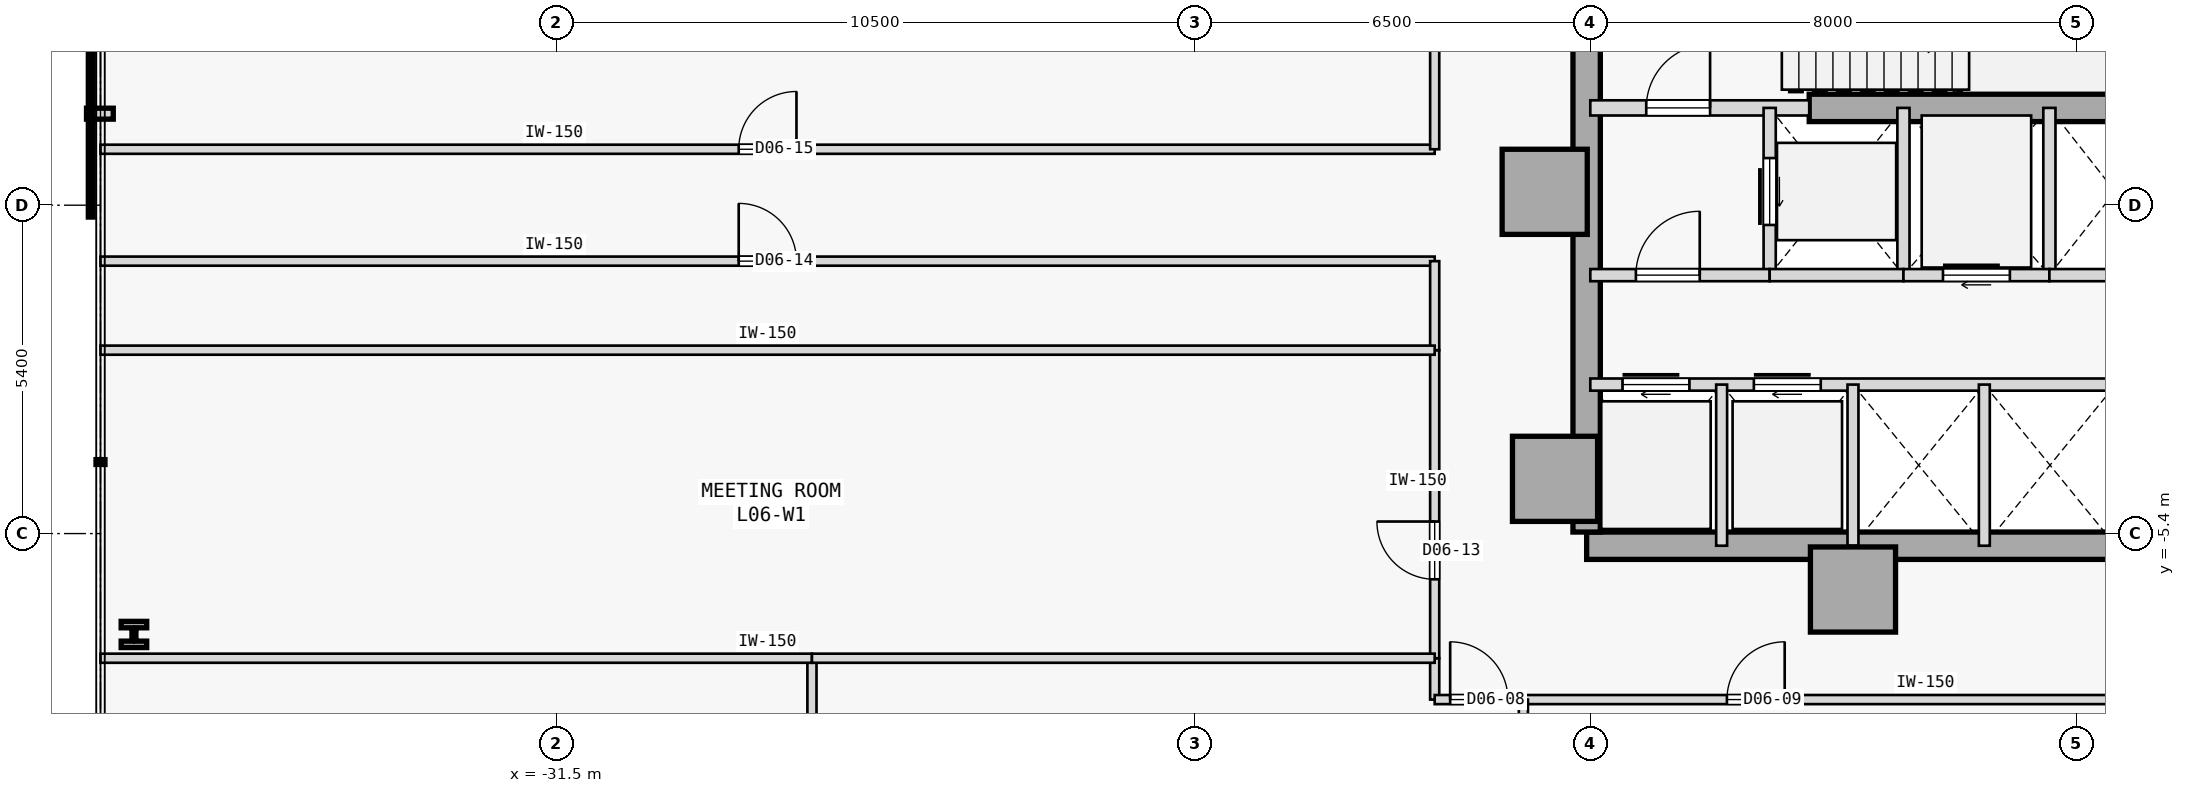
"""IFC4 building model, lengths in metres.
Left out: names, types, materials, properties, quantities, classifications, styles, units other than length and angle.
Written with IfcOpenShell. Run it as: python <this file> out.ifc"""

import sys

from ifc_helpers import new_model, si_unit, direction, frame, frame_2d, origin, origin_2d, place, context, subcontext, project, spatial, rectangle, i_section, extrude, element, fill, save


model = new_model("IFC4")
c1 = context("Model", 3, precision=1e-05, world=origin(), true_north=direction((0.0, 1.0)))
c2 = subcontext(c1, "Body", "Model", "MODEL_VIEW")
j1 = project(units=[si_unit("LENGTHUNIT", "METRE"), si_unit("PLANEANGLEUNIT", "RADIAN")], contexts=[c1])
p1 = place(None, origin())
s1 = spatial("IfcSite", under=j1, at=p1, CompositionType="ELEMENT")
p2 = place(p1, origin())
s2 = spatial("IfcBuilding", under=s1, at=p2, CompositionType="ELEMENT")
p3 = place(p2, frame((0.0, 0.0, 29.4)))
s3 = spatial("IfcBuildingStorey", under=s2, at=p3, CompositionType="ELEMENT", Elevation=29.4)
for number, where, z_axis, x_axis in (
    (1, (-15.25, 0.22, 0.0), (0.0, 0.0, 1.0), (1.0, 0.0, 0.0)),
    (2, (-15.08, -4.5, 0.0), (0.0, 0.0, 1.0), (1.0, 0.0, 0.0)),
    (3, (-10.18, -6.32, 0.0), (0.0, 0.0, 1.0), (1.0, 0.0, 0.0)),
):
    element("IfcColumn", number, at=place(p3, frame(where, z_axis=z_axis, x_axis=x_axis)), inside=s3, PredefinedType="COLUMN", context=c2, shape_type="SweptSolid", body=[
        extrude(rectangle(XDim=1.4, YDim=1.4, at=origin_2d()), origin(), (0.0, 0.0, 1.0), 3.8),
    ])
p4 = place(p3, frame((-14.56, -5.6, 0.0), z_axis=(0.0, 0.0, 1.0), x_axis=(1.0, 0.0, 0.0)))
e4 = element("IfcWall", 4, at=p4, inside=s3, PredefinedType="SHEAR", context=c2, shape_type="SweptSolid", body=[
    extrude(rectangle(XDim=10.86, YDim=0.45, at=frame_2d((5.43, 0.0))), origin(), (0.0, 0.0, 1.0), 3.575),
])
p5 = place(p3, frame((-14.56, -5.375, 0.0), z_axis=(0.0, 0.0, 1.0), x_axis=(0.0, 1.0, 0.0)))
e5 = element("IfcWall", 5, at=p5, inside=s3, PredefinedType="SHEAR", context=c2, shape_type="SweptSolid", body=[
    extrude(rectangle(XDim=10.75, YDim=0.45, at=frame_2d((5.375, 0.0))), origin(), (0.0, 0.0, 1.0), 3.575),
])
p6 = place(p3, frame((-10.9, 1.6, 0.0), z_axis=(0.0, 0.0, 1.0), x_axis=(1.0, 0.0, 0.0)))
e6 = element("IfcWall", 6, at=p6, inside=s3, PredefinedType="SHEAR", context=c2, shape_type="SweptSolid", body=[
    extrude(rectangle(XDim=5.15, YDim=0.45, at=frame_2d((2.575, 0.0))), origin(), (0.0, 0.0, 1.0), 3.575),
])
p7 = place(p3, frame((-38.45, -7.059, 0.0), z_axis=(0.0, 0.0, 1.0), x_axis=(1.0, 0.0, 0.0)))
e7 = element("IfcColumn", 7, at=p7, inside=s3, PredefinedType="COLUMN", context=c2, shape_type="SweptSolid", body=[
    extrude(i_section(OverallWidth=0.42, OverallDepth=0.431, WebThickness=0.065, FlangeThickness=0.106, FilletRadius=0.015, at=origin_2d()), origin(), (0.0, 0.0, 1.0), 3.8),
])
p8 = place(p3, frame((-14.5, 1.6, 0.0), z_axis=(0.0, 0.0, 1.0), x_axis=(1.0, 0.0, 0.0)))
e8 = element("IfcWall", 8, at=p8, inside=s3, PredefinedType="STANDARD", context=c2, shape_type="SweptSolid", body=[
    extrude(rectangle(XDim=3.6, YDim=0.25, at=frame_2d((1.8, 0.0))), origin(), (0.0, 0.0, 1.0), 3.575),
])
p9 = place(p8, frame((0.92, 0.0, 0.0)))
e9 = element("IfcOpeningElement", 9, at=p9, cuts=e8, PredefinedType="OPENING", context=c2, shape_type="SweptSolid", body=[
    extrude(rectangle(XDim=1.05, YDim=2.15, at=frame_2d((0.525, 1.075))), frame((0.0, 0.135, 0.0), z_axis=(0.0, -1.0, 0.0), x_axis=(1.0, 0.0, 0.0)), (0.0, 0.0, 1.0), 0.27),
])
p10 = place(p3, frame((-11.55, -1.15, 0.0), z_axis=(0.0, 0.0, 1.0), x_axis=(0.0, 1.0, 0.0)))
e10 = element("IfcWall", 10, at=p10, inside=s3, PredefinedType="STANDARD", context=c2, shape_type="SweptSolid", body=[
    extrude(rectangle(XDim=2.75, YDim=0.2, at=frame_2d((1.375, 0.0))), origin(), (0.0, 0.0, 1.0), 3.575),
])
p11 = place(p10, frame((0.825, 0.0, 0.0)))
e11 = element("IfcOpeningElement", 11, at=p11, cuts=e10, PredefinedType="OPENING", context=c2, shape_type="SweptSolid", body=[
    extrude(rectangle(XDim=1.1, YDim=2.15, at=frame_2d((0.55, 1.075))), frame((0.0, 0.11, 0.0), z_axis=(0.0, -1.0, 0.0), x_axis=(1.0, 0.0, 0.0)), (0.0, 0.0, 1.0), 0.22),
])
p12 = place(p3, frame((-9.35, -1.15, 0.0), z_axis=(0.0, 0.0, 1.0), x_axis=(0.0, 1.0, 0.0)))
e12 = element("IfcWall", 12, at=p12, inside=s3, PredefinedType="STANDARD", context=c2, shape_type="SweptSolid", body=[
    extrude(rectangle(XDim=2.75, YDim=0.2, at=frame_2d((1.375, 0.0))), origin(), (0.0, 0.0, 1.0), 3.575),
])
p13 = place(p3, frame((-14.5, -1.15, 0.0), z_axis=(0.0, 0.0, 1.0), x_axis=(1.0, 0.0, 0.0)))
e13 = element("IfcWall", 13, at=p13, inside=s3, PredefinedType="STANDARD", context=c2, shape_type="SweptSolid", body=[
    extrude(rectangle(XDim=2.95, YDim=0.2, at=frame_2d((1.475, 0.0))), origin(), (0.0, 0.0, 1.0), 3.575),
])
p14 = place(p13, frame((0.75, 0.0, 0.0)))
e14 = element("IfcOpeningElement", 14, at=p14, cuts=e13, PredefinedType="OPENING", context=c2, shape_type="SweptSolid", body=[
    extrude(rectangle(XDim=1.05, YDim=2.18, at=frame_2d((0.525, 1.09))), frame((0.0, 0.11, 0.0), z_axis=(0.0, -1.0, 0.0), x_axis=(1.0, 0.0, 0.0)), (0.0, 0.0, 1.0), 0.22),
])
p15 = place(p3, frame((-11.55, -1.15, 0.0), z_axis=(0.0, 0.0, 1.0), x_axis=(1.0, 0.0, 0.0)))
e15 = element("IfcWall", 15, at=p15, inside=s3, PredefinedType="STANDARD", context=c2, shape_type="SweptSolid", body=[
    extrude(rectangle(XDim=2.2, YDim=0.2, at=frame_2d((1.1, 0.0))), origin(), (0.0, 0.0, 1.0), 3.575),
])
p16 = place(p3, frame((-6.95, -1.15, 0.0), z_axis=(0.0, 0.0, 1.0), x_axis=(0.0, 1.0, 0.0)))
e16 = element("IfcWall", 16, at=p16, inside=s3, PredefinedType="STANDARD", context=c2, shape_type="SweptSolid", body=[
    extrude(rectangle(XDim=2.75, YDim=0.2, at=frame_2d((1.375, 0.0))), origin(), (0.0, 0.0, 1.0), 3.575),
])
p17 = place(p3, frame((-9.35, -1.15, 0.0), z_axis=(0.0, 0.0, 1.0), x_axis=(1.0, 0.0, 0.0)))
e17 = element("IfcWall", 17, at=p17, inside=s3, PredefinedType="STANDARD", context=c2, shape_type="SweptSolid", body=[
    extrude(rectangle(XDim=2.4, YDim=0.2, at=frame_2d((1.2, 0.0))), origin(), (0.0, 0.0, 1.0), 3.575),
])
p18 = place(p17, frame((0.65, 0.0, 0.0)))
e18 = element("IfcOpeningElement", 18, at=p18, cuts=e17, PredefinedType="OPENING", context=c2, shape_type="SweptSolid", body=[
    extrude(rectangle(XDim=1.1, YDim=2.15, at=frame_2d((0.55, 1.075))), frame((0.0, 0.11, 0.0), z_axis=(0.0, -1.0, 0.0), x_axis=(1.0, 0.0, 0.0)), (0.0, 0.0, 1.0), 0.22),
])
p19 = place(p3, frame((-6.95, -1.15, 0.0), z_axis=(0.0, 0.0, 1.0), x_axis=(1.0, 0.0, 0.0)))
e19 = element("IfcWall", 19, at=p19, inside=s3, PredefinedType="STANDARD", context=c2, shape_type="SweptSolid", body=[
    extrude(rectangle(XDim=2.16, YDim=0.2, at=frame_2d((1.08, 0.0))), origin(), (0.0, 0.0, 1.0), 3.575),
])
p20 = place(p3, frame((-14.5, -2.95, 0.0), z_axis=(0.0, 0.0, 1.0), x_axis=(1.0, 0.0, 0.0)))
e20 = element("IfcWall", 20, at=p20, inside=s3, PredefinedType="STANDARD", context=c2, shape_type="SweptSolid", body=[
    extrude(rectangle(XDim=10.8, YDim=0.2, at=frame_2d((5.4, 0.0))), origin(), (0.0, 0.0, 1.0), 3.575),
])
p21 = place(p20, frame((0.53, 0.0, 0.0)))
e21 = element("IfcOpeningElement", 21, at=p21, cuts=e20, PredefinedType="OPENING", context=c2, shape_type="SweptSolid", body=[
    extrude(rectangle(XDim=1.1, YDim=2.15, at=frame_2d((0.55, 1.075))), frame((0.0, 0.11, 0.0), z_axis=(0.0, -1.0, 0.0), x_axis=(1.0, 0.0, 0.0)), (0.0, 0.0, 1.0), 0.22),
])
p22 = place(p20, frame((2.69, 0.0, 0.0)))
e22 = element("IfcOpeningElement", 22, at=p22, cuts=e20, PredefinedType="OPENING", context=c2, shape_type="SweptSolid", body=[
    extrude(rectangle(XDim=1.1, YDim=2.15, at=frame_2d((0.55, 1.075))), frame((0.0, 0.11, 0.0), z_axis=(0.0, -1.0, 0.0), x_axis=(1.0, 0.0, 0.0)), (0.0, 0.0, 1.0), 0.22),
])
for number, where, z_axis, x_axis in (
    (23, (-12.34, -5.6, 0.0), (0.0, 0.0, 1.0), (0.0, 1.0, 0.0)),
    (24, (-10.18, -5.6, 0.0), (0.0, 0.0, 1.0), (0.0, 1.0, 0.0)),
    (25, (-8.02, -5.6, 0.0), (0.0, 0.0, 1.0), (0.0, 1.0, 0.0)),
):
    element("IfcWall", number, at=place(p3, frame(where, z_axis=z_axis, x_axis=x_axis)), inside=s3, PredefinedType="STANDARD", context=c2, shape_type="SweptSolid", body=[
        extrude(rectangle(XDim=2.65, YDim=0.18, at=frame_2d((1.325, 0.0))), origin(), (0.0, 0.0, 1.0), 3.575),
    ])
p23 = place(p3, frame((-17.059, -8.13, 0.0), z_axis=(0.0, 0.0, 1.0), x_axis=(0.0, 1.0, 0.0)))
e26 = element("IfcWall", 26, at=p23, inside=s3, PredefinedType="PARTITIONING", context=c2, shape_type="SweptSolid", body=[
    extrude(rectangle(XDim=0.68, YDim=0.15, at=frame_2d((0.34, 0.0))), origin(), (0.0, 0.0, 1.0), 3.575),
])
p24 = place(p3, frame((-17.059, -8.13, 0.0), z_axis=(0.0, 0.0, 1.0), x_axis=(1.0, 0.0, 0.0)))
e27 = element("IfcWall", 27, at=p24, inside=s3, PredefinedType="PARTITIONING", context=c2, shape_type="SweptSolid", body=[
    extrude(rectangle(XDim=1.459, YDim=0.15, at=frame_2d((0.729, 0.0))), origin(), (0.0, 0.0, 1.0), 3.575),
])
p25 = place(p24, frame((0.254, 0.0, 0.0)))
e28 = element("IfcOpeningElement", 28, at=p25, cuts=e27, PredefinedType="OPENING", context=c2, shape_type="SweptSolid", body=[
    extrude(rectangle(XDim=0.95, YDim=2.15, at=frame_2d((0.475, 1.075))), frame((0.0, 0.085, 0.0), z_axis=(0.0, -1.0, 0.0), x_axis=(1.0, 0.0, 0.0)), (0.0, 0.0, 1.0), 0.17),
])
p26 = place(p3, frame((-15.6, -8.13, 0.0), z_axis=(0.0, 0.0, 1.0), x_axis=(1.0, 0.0, 0.0)))
e29 = element("IfcWall", 29, at=p26, inside=s3, PredefinedType="PARTITIONING", context=c2, shape_type="SweptSolid", body=[
    extrude(rectangle(XDim=10.92, YDim=0.15, at=frame_2d((5.46, 0.0))), origin(), (0.0, 0.0, 1.0), 3.575),
])
p27 = place(p26, frame((3.347, 0.0, 0.0)))
e30 = element("IfcOpeningElement", 30, at=p27, cuts=e29, PredefinedType="OPENING", context=c2, shape_type="SweptSolid", body=[
    extrude(rectangle(XDim=0.95, YDim=2.15, at=frame_2d((0.475, 1.075))), frame((0.0, 0.085, 0.0), z_axis=(0.0, -1.0, 0.0), x_axis=(1.0, 0.0, 0.0)), (0.0, 0.0, 1.0), 0.17),
])
p28 = place(p3, frame((-17.059, -7.45, 0.0), z_axis=(0.0, 0.0, 1.0), x_axis=(0.0, 1.0, 0.0)))
e31 = element("IfcWall", 31, at=p28, inside=s3, PredefinedType="PARTITIONING", context=c2, shape_type="SweptSolid", body=[
    extrude(rectangle(XDim=5.066, YDim=0.15, at=frame_2d((2.533, 0.0))), origin(), (0.0, 0.0, 1.0), 3.575),
])
p29 = place(p28, frame((1.298, 0.0, 0.0)))
e32 = element("IfcOpeningElement", 32, at=p29, cuts=e31, PredefinedType="OPENING", context=c2, shape_type="SweptSolid", body=[
    extrude(rectangle(XDim=0.95, YDim=2.15, at=frame_2d((0.475, 1.075))), frame((0.0, 0.085, 0.0), z_axis=(0.0, -1.0, 0.0), x_axis=(1.0, 0.0, 0.0)), (0.0, 0.0, 1.0), 0.17),
])
p30 = place(p3, frame((-39.0, -0.92, 0.0), z_axis=(0.0, 0.0, 1.0), x_axis=(1.0, 0.0, 0.0)))
e33 = element("IfcWall", 33, at=p30, inside=s3, PredefinedType="PARTITIONING", context=c2, shape_type="SweptSolid", body=[
    extrude(rectangle(XDim=21.941, YDim=0.15, at=frame_2d((10.97, 0.0))), origin(), (0.0, 0.0, 1.0), 3.575),
])
p31 = place(p30, frame((10.496, 0.0, 0.0)))
e34 = element("IfcOpeningElement", 34, at=p31, cuts=e33, PredefinedType="OPENING", context=c2, shape_type="SweptSolid", body=[
    extrude(rectangle(XDim=0.95, YDim=2.15, at=frame_2d((0.475, 1.075))), frame((0.0, 0.085, 0.0), z_axis=(0.0, -1.0, 0.0), x_axis=(1.0, 0.0, 0.0)), (0.0, 0.0, 1.0), 0.17),
])
p32 = place(p3, frame((-17.059, -2.384, 0.0), z_axis=(0.0, 0.0, 1.0), x_axis=(0.0, 1.0, 0.0)))
e35 = element("IfcWall", 35, at=p32, inside=s3, PredefinedType="PARTITIONING", context=c2, shape_type="SweptSolid", body=[
    extrude(rectangle(XDim=1.464, YDim=0.15, at=frame_2d((0.732, 0.0))), origin(), (0.0, 0.0, 1.0), 3.575),
])
p33 = place(p3, frame((-39.0, 0.92, 0.0), z_axis=(0.0, 0.0, 1.0), x_axis=(1.0, 0.0, 0.0)))
e36 = element("IfcWall", 36, at=p33, inside=s3, PredefinedType="PARTITIONING", context=c2, shape_type="SweptSolid", body=[
    extrude(rectangle(XDim=21.941, YDim=0.15, at=frame_2d((10.97, 0.0))), origin(), (0.0, 0.0, 1.0), 3.575),
])
p34 = place(p33, frame((10.496, 0.0, 0.0)))
e37 = element("IfcOpeningElement", 37, at=p34, cuts=e36, PredefinedType="OPENING", context=c2, shape_type="SweptSolid", body=[
    extrude(rectangle(XDim=0.95, YDim=2.15, at=frame_2d((0.475, 1.075))), frame((0.0, 0.085, 0.0), z_axis=(0.0, -1.0, 0.0), x_axis=(1.0, 0.0, 0.0)), (0.0, 0.0, 1.0), 0.17),
])
p35 = place(p3, frame((-17.059, 0.92, 0.0), z_axis=(0.0, 0.0, 1.0), x_axis=(0.0, 1.0, 0.0)))
e38 = element("IfcWall", 38, at=p35, inside=s3, PredefinedType="PARTITIONING", context=c2, shape_type="SweptSolid", body=[
    extrude(rectangle(XDim=6.53, YDim=0.15, at=frame_2d((3.265, 0.0))), origin(), (0.0, 0.0, 1.0), 3.575),
])
p36 = place(p3, frame((-27.3, -25.0, 0.0), z_axis=(0.0, 0.0, 1.0), x_axis=(0.0, 1.0, 0.0)))
e39 = element("IfcWall", 39, at=p36, inside=s3, PredefinedType="PARTITIONING", context=c2, shape_type="SweptSolid", body=[
    extrude(rectangle(XDim=17.55, YDim=0.15, at=frame_2d((8.775, 0.0))), origin(), (0.0, 0.0, 1.0), 3.575),
])
p37 = place(p36, frame((8.3, 0.0, 0.0)))
e40 = element("IfcOpeningElement", 40, at=p37, cuts=e39, PredefinedType="OPENING", context=c2, shape_type="SweptSolid", body=[
    extrude(rectangle(XDim=0.95, YDim=2.15, at=frame_2d((0.475, 1.075))), frame((0.0, 0.085, 0.0), z_axis=(0.0, -1.0, 0.0), x_axis=(1.0, 0.0, 0.0)), (0.0, 0.0, 1.0), 0.17),
])
p38 = place(p3, frame((-39.0, -7.45, 0.0), z_axis=(0.0, 0.0, 1.0), x_axis=(1.0, 0.0, 0.0)))
e41 = element("IfcWall", 41, at=p38, inside=s3, PredefinedType="PARTITIONING", context=c2, shape_type="SweptSolid", body=[
    extrude(rectangle(XDim=11.7, YDim=0.15, at=frame_2d((5.85, 0.0))), origin(), (0.0, 0.0, 1.0), 3.575),
])
p39 = place(p3, frame((-15.6, -25.0, 0.0), z_axis=(0.0, 0.0, 1.0), x_axis=(0.0, 1.0, 0.0)))
e42 = element("IfcWall", 42, at=p39, inside=s3, PredefinedType="PARTITIONING", context=c2, shape_type="SweptSolid", body=[
    extrude(rectangle(XDim=16.87, YDim=0.15, at=frame_2d((8.435, 0.0))), origin(), (0.0, 0.0, 1.0), 3.575),
])
p40 = place(p3, frame((-27.3, -7.45, 0.0), z_axis=(0.0, 0.0, 1.0), x_axis=(1.0, 0.0, 0.0)))
e43 = element("IfcWall", 43, at=p40, inside=s3, PredefinedType="PARTITIONING", context=c2, shape_type="SweptSolid", body=[
    extrude(rectangle(XDim=10.241, YDim=0.15, at=frame_2d((5.121, 0.0))), origin(), (0.0, 0.0, 1.0), 3.575),
])
p41 = place(p3, frame((-39.0, -2.384, 0.0), z_axis=(0.0, 0.0, 1.0), x_axis=(1.0, 0.0, 0.0)))
e44 = element("IfcWall", 44, at=p41, inside=s3, PredefinedType="PARTITIONING", context=c2, shape_type="SweptSolid", body=[
    extrude(rectangle(XDim=21.941, YDim=0.15, at=frame_2d((10.97, 0.0))), origin(), (0.0, 0.0, 1.0), 3.575),
])
p42 = place(p9, origin())
e45 = element("IfcDoor", 45, at=p42, inside=s3, OperationType="SINGLE_SWING_RIGHT", PredefinedType="DOOR", context=c2, shape_type="SweptSolid", body=[
    extrude(rectangle(XDim=1.05, YDim=2.15, at=frame_2d((0.525, 1.075))), frame((0.0, 0.025, 0.0), z_axis=(0.0, -1.0, 0.0), x_axis=(1.0, 0.0, 0.0)), (0.0, 0.0, 1.0), 0.05),
])
fill(e9, e45)
p43 = place(p14, origin())
e46 = element("IfcDoor", 46, at=p43, inside=s3, OperationType="SINGLE_SWING_RIGHT", PredefinedType="DOOR", context=c2, shape_type="SweptSolid", body=[
    extrude(rectangle(XDim=1.05, YDim=2.18, at=frame_2d((0.525, 1.09))), frame((0.0, 0.025, 0.0), z_axis=(0.0, -1.0, 0.0), x_axis=(1.0, 0.0, 0.0)), (0.0, 0.0, 1.0), 0.05),
])
fill(e14, e46)
p44 = place(p11, origin())
e47 = element("IfcDoor", 47, at=p44, inside=s3, OperationType="SLIDING_TO_RIGHT", PredefinedType="DOOR", context=c2, shape_type="SweptSolid", body=[
    extrude(rectangle(XDim=1.1, YDim=2.15, at=frame_2d((0.55, 1.075))), frame((0.0, 0.025, 0.0), z_axis=(0.0, -1.0, 0.0), x_axis=(1.0, 0.0, 0.0)), (0.0, 0.0, 1.0), 0.05),
])
fill(e11, e47)
p45 = place(p18, origin())
e48 = element("IfcDoor", 48, at=p45, inside=s3, OperationType="SLIDING_TO_RIGHT", PredefinedType="DOOR", context=c2, shape_type="SweptSolid", body=[
    extrude(rectangle(XDim=1.1, YDim=2.15, at=frame_2d((0.55, 1.075))), frame((0.0, 0.025, 0.0), z_axis=(0.0, -1.0, 0.0), x_axis=(1.0, 0.0, 0.0)), (0.0, 0.0, 1.0), 0.05),
])
fill(e18, e48)
p46 = place(p21, origin())
e49 = element("IfcDoor", 49, at=p46, inside=s3, OperationType="SLIDING_TO_RIGHT", PredefinedType="DOOR", context=c2, shape_type="SweptSolid", body=[
    extrude(rectangle(XDim=1.1, YDim=2.15, at=frame_2d((0.55, 1.075))), frame((0.0, 0.025, 0.0), z_axis=(0.0, -1.0, 0.0), x_axis=(1.0, 0.0, 0.0)), (0.0, 0.0, 1.0), 0.05),
])
fill(e21, e49)
p47 = place(p22, origin())
e50 = element("IfcDoor", 50, at=p47, inside=s3, OperationType="SLIDING_TO_RIGHT", PredefinedType="DOOR", context=c2, shape_type="SweptSolid", body=[
    extrude(rectangle(XDim=1.1, YDim=2.15, at=frame_2d((0.55, 1.075))), frame((0.0, 0.025, 0.0), z_axis=(0.0, -1.0, 0.0), x_axis=(1.0, 0.0, 0.0)), (0.0, 0.0, 1.0), 0.05),
])
fill(e22, e50)
p48 = place(p25, origin())
e51 = element("IfcDoor", 51, at=p48, inside=s3, OperationType="SINGLE_SWING_LEFT", PredefinedType="DOOR", context=c2, shape_type="SweptSolid", body=[
    extrude(rectangle(XDim=0.95, YDim=2.15, at=frame_2d((0.475, 1.075))), frame((0.0, 0.025, 0.0), z_axis=(0.0, -1.0, 0.0), x_axis=(1.0, 0.0, 0.0)), (0.0, 0.0, 1.0), 0.05),
])
fill(e28, e51)
p49 = place(p27, origin())
e52 = element("IfcDoor", 52, at=p49, inside=s3, OperationType="SINGLE_SWING_RIGHT", PredefinedType="DOOR", context=c2, shape_type="SweptSolid", body=[
    extrude(rectangle(XDim=0.95, YDim=2.15, at=frame_2d((0.475, 1.075))), frame((0.0, 0.025, 0.0), z_axis=(0.0, -1.0, 0.0), x_axis=(1.0, 0.0, 0.0)), (0.0, 0.0, 1.0), 0.05),
])
fill(e30, e52)
p50 = place(p29, origin())
e53 = element("IfcDoor", 53, at=p50, inside=s3, OperationType="SINGLE_SWING_RIGHT", PredefinedType="DOOR", context=c2, shape_type="SweptSolid", body=[
    extrude(rectangle(XDim=0.95, YDim=2.15, at=frame_2d((0.475, 1.075))), frame((0.0, 0.025, 0.0), z_axis=(0.0, -1.0, 0.0), x_axis=(1.0, 0.0, 0.0)), (0.0, 0.0, 1.0), 0.05),
])
fill(e32, e53)
p51 = place(p31, origin())
e54 = element("IfcDoor", 54, at=p51, inside=s3, OperationType="SINGLE_SWING_LEFT", PredefinedType="DOOR", context=c2, shape_type="SweptSolid", body=[
    extrude(rectangle(XDim=0.95, YDim=2.15, at=frame_2d((0.475, 1.075))), frame((0.0, 0.025, 0.0), z_axis=(0.0, -1.0, 0.0), x_axis=(1.0, 0.0, 0.0)), (0.0, 0.0, 1.0), 0.05),
])
fill(e34, e54)
p52 = place(p34, origin())
e55 = element("IfcDoor", 55, at=p52, inside=s3, OperationType="SINGLE_SWING_RIGHT", PredefinedType="DOOR", context=c2, shape_type="SweptSolid", body=[
    extrude(rectangle(XDim=0.95, YDim=2.15, at=frame_2d((0.475, 1.075))), frame((0.0, 0.025, 0.0), z_axis=(0.0, -1.0, 0.0), x_axis=(1.0, 0.0, 0.0)), (0.0, 0.0, 1.0), 0.05),
])
fill(e37, e55)
save(model, sys.argv[1])
